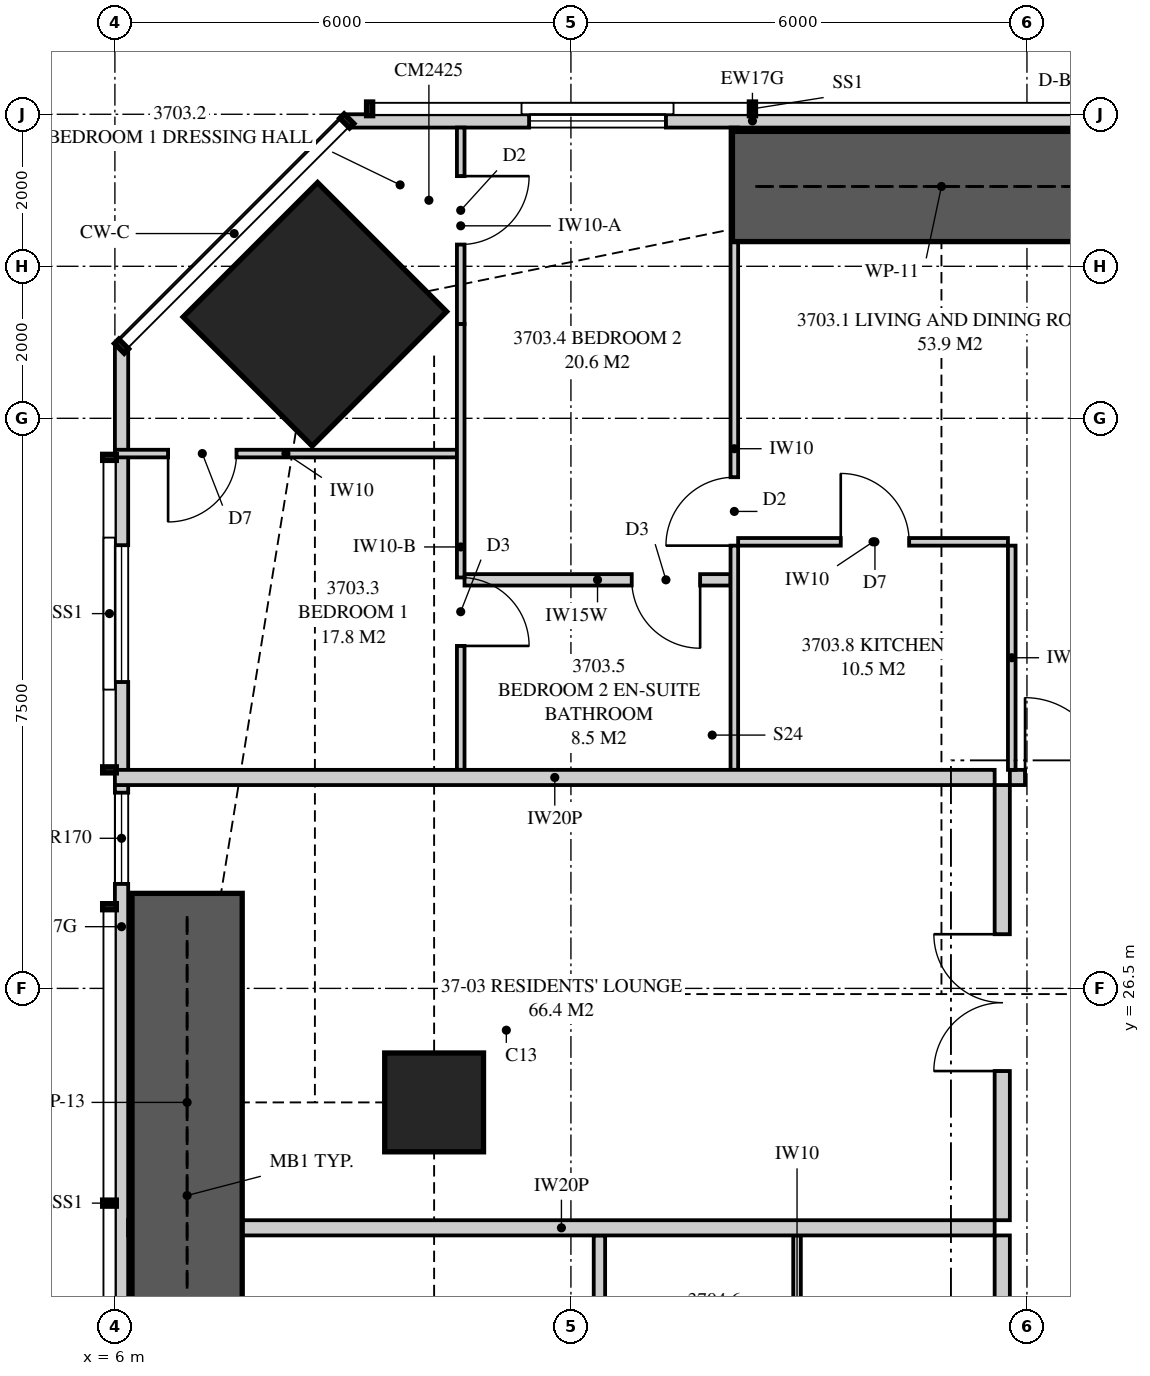
"""IFC4 building model, lengths in metres.
Left out: names, types, materials, properties, quantities, classifications, styles, units other than length and angle.
Written with IfcOpenShell. Run it as: python <this file> out.ifc"""

import sys

from ifc_helpers import new_model, si_unit, direction, frame, frame_2d, origin, origin_2d, place, context, subcontext, project, spatial, polyline, rectangle, outline, extrude, element, fill, save


model = new_model("IFC4")
c1 = context("Model", 3, precision=1e-05, world=origin(), true_north=direction((0.0, 1.0)))
c2 = subcontext(c1, "Body", "Model", "MODEL_VIEW")
j1 = project(units=[si_unit("LENGTHUNIT", "METRE"), si_unit("PLANEANGLEUNIT", "RADIAN")], contexts=[c1])
p1 = place(None, origin())
s1 = spatial("IfcSite", under=j1, at=p1, CompositionType="ELEMENT")
p2 = place(p1, origin())
s2 = spatial("IfcBuilding", under=s1, at=p2, CompositionType="ELEMENT")
p3 = place(p2, frame((0.0, 0.0, 135.0)))
s3 = spatial("IfcBuildingStorey", under=s2, at=p3, CompositionType="ELEMENT", Elevation=135.0)
p4 = place(p3, frame((8.631, 35.369, 0.0), z_axis=(0.0, 0.0, 1.0), x_axis=(0.707106781187, -0.707106781187, 0.0)))
e1 = element("IfcColumn", 1, at=p4, inside=s3, PredefinedType="COLUMN", context=c2, shape_type="SweptSolid", body=[
    extrude(rectangle(XDim=2.4, YDim=2.5, at=origin_2d()), origin(), (0.0, 0.0, 1.0), 3.35),
])
p5 = place(p3, frame((10.2, 25.0, 0.0), z_axis=(0.0, 0.0, 1.0), x_axis=(1.0, 0.0, 0.0)))
e2 = element("IfcColumn", 2, at=p5, inside=s3, PredefinedType="COLUMN", context=c2, shape_type="SweptSolid", body=[
    extrude(rectangle(XDim=1.3, YDim=1.3, at=origin_2d()), origin(), (0.0, 0.0, 1.0), 3.35),
])
p6 = place(p3, frame((19.725, 37.913, 0.0), z_axis=(0.0, 0.0, 1.0), x_axis=(-1.0, 0.0, 0.0)))
e3 = element("IfcWall", 3, at=p6, inside=s3, PredefinedType="SOLIDWALL", context=c2, shape_type="SweptSolid", body=[
    extrude(outline(polyline([(0.0, 0.0), (10.674, 0.0), (10.674, 3.11), (3.053, 3.11), (3.053, 2.15), (3.008, 2.15), (3.008, 3.11), (2.85, 3.11), (2.85, 2.15), (0.0, 2.15), (0.0, 0.0)])), frame((0.0, 0.087, 0.0), z_axis=(0.0, -1.0, 0.0), x_axis=(1.0, 0.0, 0.0)), (0.0, 0.0, 1.0), 0.175),
])
p7 = place(p6, frame((6.475, 0.0, 0.4)))
e4 = element("IfcOpeningElement", 4, at=p7, cuts=e3, PredefinedType="OPENING", context=c2, shape_type="SweptSolid", body=[
    extrude(rectangle(XDim=1.8, YDim=1.7, at=frame_2d((0.9, 0.85))), frame((0.0, 0.097, 0.0), z_axis=(0.0, -1.0, 0.0), x_axis=(1.0, 0.0, 0.0)), (0.0, 0.0, 1.0), 0.195),
])
p8 = place(p3, frame((6.087, 34.949, 0.0), z_axis=(0.0, 0.0, 1.0), x_axis=(0.0, -1.0, 0.0)))
e5 = element("IfcWall", 5, at=p8, inside=s3, PredefinedType="SOLIDWALL", context=c2, shape_type="SweptSolid", body=[
    extrude(outline(polyline([(0.0, 0.0), (15.274, 0.0), (15.274, 2.15), (9.949, 2.15), (9.949, 3.11), (9.823, 3.11), (9.823, 2.15), (9.73, 2.15), (9.73, 3.11), (0.0, 3.11), (0.0, 0.0)])), frame((0.0, 0.087, 0.0), z_axis=(0.0, -1.0, 0.0), x_axis=(1.0, 0.0, 0.0)), (0.0, 0.0, 1.0), 0.175),
])
p9 = place(p8, frame((2.618, 0.0, 0.4)))
e6 = element("IfcOpeningElement", 6, at=p9, cuts=e5, PredefinedType="OPENING", context=c2, shape_type="SweptSolid", body=[
    extrude(rectangle(XDim=1.8, YDim=1.7, at=frame_2d((0.9, 0.85))), frame((0.0, 0.097, 0.0), z_axis=(0.0, -1.0, 0.0), x_axis=(1.0, 0.0, 0.0)), (0.0, 0.0, 1.0), 0.195),
])
p10 = place(p8, frame((5.874, 0.0, 0.4)))
e7 = element("IfcOpeningElement", 7, at=p10, cuts=e5, PredefinedType="OPENING", context=c2, shape_type="SweptSolid", body=[
    extrude(rectangle(XDim=1.2, YDim=1.7, at=frame_2d((0.6, 0.85))), frame((0.0, 0.097, 0.0), z_axis=(0.0, -1.0, 0.0), x_axis=(1.0, 0.0, 0.0)), (0.0, 0.0, 1.0), 0.195),
])
p11 = place(p8, frame((12.819, 0.0, 0.4)))
e8 = element("IfcOpeningElement", 8, at=p11, cuts=e5, PredefinedType="OPENING", context=c2, shape_type="SweptSolid", body=[
    extrude(rectangle(XDim=1.8, YDim=1.7, at=frame_2d((0.9, 0.85))), frame((0.0, 0.097, 0.0), z_axis=(0.0, -1.0, 0.0), x_axis=(1.0, 0.0, 0.0)), (0.0, 0.0, 1.0), 0.195),
])
p12 = place(p3, frame((17.775, 29.275, 0.0), z_axis=(0.0, 0.0, 1.0), x_axis=(1.0, 0.0, 0.0)))
e9 = element("IfcWall", 9, at=p12, inside=s3, PredefinedType="PARTITIONING", context=c2, shape_type="SweptSolid", body=[
    extrude(rectangle(XDim=8.225, YDim=0.2, at=frame_2d((4.113, 0.0))), origin(), (0.0, 0.0, 1.0), 3.11),
])
p13 = place(p12, frame((0.2, 0.0, 0.0)))
e10 = element("IfcOpeningElement", 10, at=p13, cuts=e9, PredefinedType="OPENING", context=c2, shape_type="SweptSolid", body=[
    extrude(rectangle(XDim=1.05, YDim=2.2, at=frame_2d((0.525, 1.1))), frame((0.0, 0.11, 0.0), z_axis=(0.0, -1.0, 0.0), x_axis=(1.0, 0.0, 0.0)), (0.0, 0.0, 1.0), 0.22),
])
p14 = place(p3, frame((10.55, 37.825, 0.0), z_axis=(0.0, 0.0, 1.0), x_axis=(0.0, -1.0, 0.0)))
e11 = element("IfcWall", 11, at=p14, inside=s3, PredefinedType="PARTITIONING", context=c2, shape_type="SweptSolid", body=[
    extrude(outline(polyline([(0.0, 0.0), (2.585, 0.0), (2.585, 2.15), (1.188, 2.15), (1.188, 3.11), (0.0, 3.11), (0.0, 0.0)])), frame((0.0, 0.05, 0.0), z_axis=(0.0, -1.0, 0.0), x_axis=(1.0, 0.0, 0.0)), (0.0, 0.0, 1.0), 0.1),
])
p15 = place(p14, frame((0.639, 0.0, 0.0)))
e12 = element("IfcOpeningElement", 12, at=p15, cuts=e11, PredefinedType="OPENING", context=c2, shape_type="SweptSolid", body=[
    extrude(rectangle(XDim=0.9, YDim=2.1, at=frame_2d((0.45, 1.05))), frame((0.0, 0.06, 0.0), z_axis=(0.0, -1.0, 0.0), x_axis=(1.0, 0.0, 0.0)), (0.0, 0.0, 1.0), 0.12),
])
p16 = place(p3, frame((10.55, 35.24, 0.0), z_axis=(0.0, 0.0, 1.0), x_axis=(0.0, -1.0, 0.0)))
e13 = element("IfcWall", 13, at=p16, inside=s3, PredefinedType="PARTITIONING", context=c2, shape_type="SweptSolid", body=[
    extrude(outline(polyline([(0.0, 0.0), (5.865, 0.0), (5.865, 2.51), (0.358, 2.51), (0.358, 2.15), (0.0, 2.15), (0.0, 0.0)])), frame((0.0, 0.05, 0.0), z_axis=(0.0, -1.0, 0.0), x_axis=(1.0, 0.0, 0.0)), (0.0, 0.0, 1.0), 0.1),
])
p17 = place(p16, frame((3.334, 0.0, 0.0)))
e14 = element("IfcOpeningElement", 14, at=p17, cuts=e13, PredefinedType="OPENING", context=c2, shape_type="SweptSolid", body=[
    extrude(rectangle(XDim=0.9, YDim=2.1, at=frame_2d((0.45, 1.05))), frame((0.0, 0.06, 0.0), z_axis=(0.0, -1.0, 0.0), x_axis=(1.0, 0.0, 0.0)), (0.0, 0.0, 1.0), 0.12),
])
p18 = place(p3, frame((14.15, 37.825, 0.0), z_axis=(0.0, 0.0, 1.0), x_axis=(0.0, -1.0, 0.0)))
e15 = element("IfcWall", 15, at=p18, inside=s3, PredefinedType="PARTITIONING", context=c2, shape_type="SweptSolid", body=[
    extrude(outline(polyline([(0.0, 0.0), (8.45, 0.0), (8.45, 3.11), (2.208, 3.11), (2.208, 2.15), (0.453, 2.15), (0.453, 3.11), (0.0, 3.11), (0.0, 0.0)])), frame((0.0, 0.05, 0.0), z_axis=(0.0, -1.0, 0.0), x_axis=(1.0, 0.0, 0.0)), (0.0, 0.0, 1.0), 0.1),
])
p19 = place(p18, frame((4.6, 0.0, 0.0)))
e16 = element("IfcOpeningElement", 16, at=p19, cuts=e15, PredefinedType="OPENING", context=c2, shape_type="SweptSolid", body=[
    extrude(rectangle(XDim=0.9, YDim=2.1, at=frame_2d((0.45, 1.05))), frame((0.0, 0.06, 0.0), z_axis=(0.0, -1.0, 0.0), x_axis=(1.0, 0.0, 0.0)), (0.0, 0.0, 1.0), 0.12),
])
p20 = place(p3, frame((6.0, 33.536, 0.0), z_axis=(0.0, 0.0, 1.0), x_axis=(1.0, 0.0, 0.0)))
e17 = element("IfcWall", 17, at=p20, inside=s3, PredefinedType="PARTITIONING", context=c2, shape_type="SweptSolid", body=[
    extrude(outline(polyline([(0.0, 0.0), (4.5, 0.0), (4.5, 3.11), (4.5, 2.51), (3.206, 2.51), (3.206, 2.15), (1.463, 2.15), (1.463, 3.11), (0.0, 3.11), (0.0, 0.0)])), frame((0.0, 0.05, 0.0), z_axis=(0.0, -1.0, 0.0), x_axis=(1.0, 0.0, 0.0)), (0.0, 0.0, 1.0), 0.1),
])
p21 = place(p20, frame((0.7, 0.0, 0.0)))
e18 = element("IfcOpeningElement", 18, at=p21, cuts=e17, PredefinedType="OPENING", context=c2, shape_type="SweptSolid", body=[
    extrude(rectangle(XDim=0.9, YDim=2.1, at=frame_2d((0.45, 1.05))), frame((0.0, 0.06, 0.0), z_axis=(0.0, -1.0, 0.0), x_axis=(1.0, 0.0, 0.0)), (0.0, 0.0, 1.0), 0.12),
])
p22 = place(p3, frame((10.6, 31.875, 0.0), z_axis=(0.0, 0.0, 1.0), x_axis=(1.0, 0.0, 0.0)))
e19 = element("IfcWall", 19, at=p22, inside=s3, PredefinedType="PLUMBINGWALL", context=c2, shape_type="SweptSolid", body=[
    extrude(outline(polyline([(0.0, 0.0), (3.5, 0.0), (3.5, 3.11), (0.885, 3.11), (0.885, 2.51), (0.0, 2.51), (0.0, 3.11), (0.0, 0.0)])), frame((0.0, 0.075, 0.0), z_axis=(0.0, -1.0, 0.0), x_axis=(1.0, 0.0, 0.0)), (0.0, 0.0, 1.0), 0.15),
])
p23 = place(p22, frame((2.2, 0.0, 0.0)))
e20 = element("IfcOpeningElement", 20, at=p23, cuts=e19, PredefinedType="OPENING", context=c2, shape_type="SweptSolid", body=[
    extrude(rectangle(XDim=0.9, YDim=2.1, at=frame_2d((0.45, 1.05))), frame((0.0, 0.085, 0.0), z_axis=(0.0, -1.0, 0.0), x_axis=(1.0, 0.0, 0.0)), (0.0, 0.0, 1.0), 0.17),
])
p24 = place(p3, frame((14.2, 32.375, 0.0), z_axis=(0.0, 0.0, 1.0), x_axis=(1.0, 0.0, 0.0)))
e21 = element("IfcWall", 21, at=p24, inside=s3, PredefinedType="PARTITIONING", context=c2, shape_type="SweptSolid", body=[
    extrude(outline(polyline([(0.0, 0.0), (3.55, 0.0), (3.55, 3.11), (2.962, 3.11), (2.962, 2.541), (2.388, 2.541), (2.388, 3.11), (0.0, 3.11), (0.0, 0.0)])), frame((0.0, 0.05, 0.0), z_axis=(0.0, -1.0, 0.0), x_axis=(1.0, 0.0, 0.0)), (0.0, 0.0, 1.0), 0.1),
])
p25 = place(p24, frame((1.35, 0.0, 0.0)))
e22 = element("IfcOpeningElement", 22, at=p25, cuts=e21, PredefinedType="OPENING", context=c2, shape_type="SweptSolid", body=[
    extrude(rectangle(XDim=0.9, YDim=2.1, at=frame_2d((0.45, 1.05))), frame((0.0, 0.06, 0.0), z_axis=(0.0, -1.0, 0.0), x_axis=(1.0, 0.0, 0.0)), (0.0, 0.0, 1.0), 0.12),
])
p26 = place(p3, frame((17.8, 32.325, 0.0), z_axis=(0.0, 0.0, 1.0), x_axis=(0.0, -1.0, 0.0)))
e23 = element("IfcWall", 23, at=p26, inside=s3, PredefinedType="PARTITIONING", context=c2, shape_type="SweptSolid", body=[
    extrude(rectangle(XDim=2.95, YDim=0.1, at=frame_2d((1.475, 0.0))), origin(), (0.0, 0.0, 1.0), 3.11),
])
p27 = place(p3, frame((6.0, 29.275, 0.0), z_axis=(0.0, 0.0, 1.0), x_axis=(1.0, 0.0, 0.0)))
e24 = element("IfcWall", 24, at=p27, inside=s3, PredefinedType="PARTITIONING", context=c2, shape_type="SweptSolid", body=[
    extrude(outline(polyline([(0.0, 0.0), (11.575, 0.0), (11.575, 3.11), (11.212, 3.11), (11.212, 2.541), (10.538, 2.541), (10.538, 3.11), (5.51, 3.11), (5.51, 2.51), (2.969, 2.51), (2.969, 2.541), (2.565, 2.541), (2.565, 2.15), (0.721, 2.15), (0.721, 3.11), (0.0, 3.11), (0.0, 0.0)])), frame((0.0, 0.1, 0.0), z_axis=(0.0, -1.0, 0.0), x_axis=(1.0, 0.0, 0.0)), (0.0, 0.0, 1.0), 0.2),
])
p28 = place(p3, frame((6.175, 23.35, 0.0), z_axis=(0.0, 0.0, 1.0), x_axis=(1.0, 0.0, 0.0)))
e25 = element("IfcWall", 25, at=p28, inside=s3, PredefinedType="PARTITIONING", context=c2, shape_type="SweptSolid", body=[
    extrude(outline(polyline([(0.529, 2.15), (0.0, 2.15), (0.0, 0.0), (0.529, 0.0), (0.529, 0.376), (1.021, 0.376), (1.021, 0.0), (11.4, 0.0), (11.4, 3.11), (5.335, 3.11), (5.335, 2.51), (2.715, 2.51), (2.715, 3.11), (1.685, 3.11), (1.685, 2.15), (1.021, 2.15), (1.021, 1.774), (0.529, 1.774), (0.529, 2.15)])), frame((0.0, 0.1, 0.0), z_axis=(0.0, -1.0, 0.0), x_axis=(1.0, 0.0, 0.0)), (0.0, 0.0, 1.0), 0.2),
])
p29 = place(p3, frame((17.675, 7.825, 0.0), z_axis=(0.0, 0.0, 1.0), x_axis=(0.0, 1.0, 0.0)))
e26 = element("IfcWall", 26, at=p29, inside=s3, PredefinedType="PARTITIONING", context=c2, shape_type="SweptSolid", body=[
    extrude(outline(polyline([(0.0, 0.0), (15.425, 0.0), (15.425, 3.11), (3.087, 3.11), (3.087, 2.541), (2.413, 2.541), (2.413, 3.11), (0.0, 3.11), (0.0, 0.0)])), frame((0.0, 0.1, 0.0), z_axis=(0.0, -1.0, 0.0), x_axis=(1.0, 0.0, 0.0)), (0.0, 0.0, 1.0), 0.2),
])
p30 = place(p29, frame((7.212, 0.0, 0.0)))
e27 = element("IfcOpeningElement", 27, at=p30, cuts=e26, PredefinedType="OPENING", context=c2, shape_type="SweptSolid", body=[
    extrude(rectangle(XDim=1.05, YDim=2.2, at=frame_2d((0.525, 1.1))), frame((0.0, 0.11, 0.0), z_axis=(0.0, -1.0, 0.0), x_axis=(1.0, 0.0, 0.0)), (0.0, 0.0, 1.0), 0.22),
])
p31 = place(p3, frame((12.375, 19.775, 0.0), z_axis=(0.0, 0.0, 1.0), x_axis=(0.0, 1.0, 0.0)))
e28 = element("IfcWall", 28, at=p31, inside=s3, PredefinedType="PLUMBINGWALL", context=c2, shape_type="SweptSolid", body=[
    extrude(rectangle(XDim=3.475, YDim=0.15, at=frame_2d((1.738, 0.0))), origin(), (0.0, 0.0, 1.0), 3.11),
])
p32 = place(p31, frame((0.4, 0.0, 0.0)))
e29 = element("IfcOpeningElement", 29, at=p32, cuts=e28, PredefinedType="OPENING", context=c2, shape_type="SweptSolid", body=[
    extrude(rectangle(XDim=0.9, YDim=2.1, at=frame_2d((0.45, 1.05))), frame((0.0, 0.085, 0.0), z_axis=(0.0, -1.0, 0.0), x_axis=(1.0, 0.0, 0.0)), (0.0, 0.0, 1.0), 0.17),
])
p33 = place(p3, frame((14.975, 19.775, 0.0), z_axis=(0.0, 0.0, 1.0), x_axis=(0.0, 1.0, 0.0)))
e30 = element("IfcWall", 30, at=p33, inside=s3, PredefinedType="PARTITIONING", context=c2, shape_type="SweptSolid", body=[
    extrude(rectangle(XDim=3.475, YDim=0.1, at=frame_2d((1.738, 0.0))), origin(), (0.0, 0.0, 1.0), 3.11),
])
p34 = place(p3, frame((17.675, 23.45, 0.0), z_axis=(0.0, 0.0, 1.0), x_axis=(0.0, 1.0, 0.0)))
e31 = element("IfcWall", 31, at=p34, inside=s3, PredefinedType="PARTITIONING", context=c2, shape_type="SweptSolid", body=[
    extrude(outline(polyline([(0.0, 0.0), (5.725, 0.0), (5.725, 3.11), (3.312, 3.11), (3.312, 2.541), (2.638, 2.541), (2.638, 3.11), (0.0, 3.11), (0.0, 0.0)])), frame((0.0, 0.1, 0.0), z_axis=(0.0, -1.0, 0.0), x_axis=(1.0, 0.0, 0.0)), (0.0, 0.0, 1.0), 0.2),
])
p35 = place(p34, frame((1.962, 0.0, 0.0)))
e32 = element("IfcOpeningElement", 32, at=p35, cuts=e31, PredefinedType="OPENING", context=c2, shape_type="SweptSolid", body=[
    extrude(rectangle(XDim=1.8, YDim=2.1, at=frame_2d((0.9, 1.05))), frame((0.0, 0.11, 0.0), z_axis=(0.0, -1.0, 0.0), x_axis=(1.0, 0.0, 0.0)), (0.0, 0.0, 1.0), 0.22),
])
for number, where, z_axis, x_axis in (
    (33, (14.125, 37.05, 0.0), (0.0, 0.0, 1.0), (1.0, 0.0, 0.0)),
    (34, (6.95, 22.25, 0.0), (0.0, 0.0, 1.0), (0.0, 1.0, 0.0)),
):
    element("IfcWall", number, at=place(p3, frame(where, z_axis=z_axis, x_axis=x_axis)), inside=s3, PredefinedType="SHEAR", context=c2, shape_type="SweptSolid", body=[
        extrude(rectangle(XDim=5.5, YDim=1.45, at=frame_2d((2.75, 0.0))), origin(), (0.0, 0.0, 1.0), 3.35),
    ])
p36 = place(p7, origin())
e35 = element("IfcWindow", 35, at=p36, inside=s3, PartitioningType="SINGLE_PANEL", PredefinedType="WINDOW", context=c2, shape_type="SweptSolid", body=[
    extrude(rectangle(XDim=1.8, YDim=1.7, at=frame_2d((0.9, 0.85))), frame((0.0, 0.03, 0.0), z_axis=(0.0, -1.0, 0.0), x_axis=(1.0, 0.0, 0.0)), (0.0, 0.0, 1.0), 0.06),
])
fill(e4, e35)
p37 = place(p9, origin())
e36 = element("IfcWindow", 36, at=p37, inside=s3, PartitioningType="SINGLE_PANEL", PredefinedType="WINDOW", context=c2, shape_type="SweptSolid", body=[
    extrude(rectangle(XDim=1.8, YDim=1.7, at=frame_2d((0.9, 0.85))), frame((0.0, 0.03, 0.0), z_axis=(0.0, -1.0, 0.0), x_axis=(1.0, 0.0, 0.0)), (0.0, 0.0, 1.0), 0.06),
])
fill(e6, e36)
p38 = place(p10, origin())
e37 = element("IfcWindow", 37, at=p38, inside=s3, PartitioningType="SINGLE_PANEL", PredefinedType="WINDOW", context=c2, shape_type="SweptSolid", body=[
    extrude(rectangle(XDim=1.2, YDim=1.7, at=frame_2d((0.6, 0.85))), frame((0.0, 0.03, 0.0), z_axis=(0.0, -1.0, 0.0), x_axis=(1.0, 0.0, 0.0)), (0.0, 0.0, 1.0), 0.06),
])
fill(e7, e37)
p39 = place(p13, origin())
e38 = element("IfcDoor", 38, at=p39, inside=s3, OperationType="SINGLE_SWING_LEFT", PredefinedType="DOOR", context=c2, shape_type="SweptSolid", body=[
    extrude(rectangle(XDim=1.05, YDim=2.2, at=frame_2d((0.525, 1.1))), frame((0.0, 0.025, 0.0), z_axis=(0.0, -1.0, 0.0), x_axis=(1.0, 0.0, 0.0)), (0.0, 0.0, 1.0), 0.05),
])
fill(e10, e38)
p40 = place(p21, frame((0.9, 0.0, 0.0), z_axis=(0.0, 0.0, 1.0), x_axis=(-1.0, 0.0, 0.0)))
e39 = element("IfcDoor", 39, at=p40, inside=s3, OperationType="SINGLE_SWING_RIGHT", PredefinedType="DOOR", context=c2, shape_type="SweptSolid", body=[
    extrude(rectangle(XDim=0.9, YDim=2.1, at=frame_2d((0.45, 1.05))), frame((0.0, 0.025, 0.0), z_axis=(0.0, -1.0, 0.0), x_axis=(1.0, 0.0, 0.0)), (0.0, 0.0, 1.0), 0.05),
])
fill(e18, e39)
p41 = place(p15, origin())
e40 = element("IfcDoor", 40, at=p41, inside=s3, OperationType="SINGLE_SWING_LEFT", PredefinedType="DOOR", context=c2, shape_type="SweptSolid", body=[
    extrude(rectangle(XDim=0.9, YDim=2.1, at=frame_2d((0.45, 1.05))), frame((0.0, 0.025, 0.0), z_axis=(0.0, -1.0, 0.0), x_axis=(1.0, 0.0, 0.0)), (0.0, 0.0, 1.0), 0.05),
])
fill(e12, e40)
p42 = place(p19, frame((0.9, 0.0, 0.0), z_axis=(0.0, 0.0, 1.0), x_axis=(-1.0, 0.0, 0.0)))
e41 = element("IfcDoor", 41, at=p42, inside=s3, OperationType="SINGLE_SWING_LEFT", PredefinedType="DOOR", context=c2, shape_type="SweptSolid", body=[
    extrude(rectangle(XDim=0.9, YDim=2.1, at=frame_2d((0.45, 1.05))), frame((0.0, 0.025, 0.0), z_axis=(0.0, -1.0, 0.0), x_axis=(1.0, 0.0, 0.0)), (0.0, 0.0, 1.0), 0.05),
])
fill(e16, e41)
p43 = place(p23, frame((0.9, 0.0, 0.0), z_axis=(0.0, 0.0, 1.0), x_axis=(-1.0, 0.0, 0.0)))
e42 = element("IfcDoor", 42, at=p43, inside=s3, OperationType="SINGLE_SWING_LEFT", PredefinedType="DOOR", context=c2, shape_type="SweptSolid", body=[
    extrude(rectangle(XDim=0.9, YDim=2.1, at=frame_2d((0.45, 1.05))), frame((0.0, 0.025, 0.0), z_axis=(0.0, -1.0, 0.0), x_axis=(1.0, 0.0, 0.0)), (0.0, 0.0, 1.0), 0.05),
])
fill(e20, e42)
p44 = place(p17, origin())
e43 = element("IfcDoor", 43, at=p44, inside=s3, OperationType="SINGLE_SWING_RIGHT", PredefinedType="DOOR", context=c2, shape_type="SweptSolid", body=[
    extrude(rectangle(XDim=0.9, YDim=2.1, at=frame_2d((0.45, 1.05))), frame((0.0, 0.025, 0.0), z_axis=(0.0, -1.0, 0.0), x_axis=(1.0, 0.0, 0.0)), (0.0, 0.0, 1.0), 0.05),
])
fill(e14, e43)
p45 = place(p25, origin())
e44 = element("IfcDoor", 44, at=p45, inside=s3, OperationType="SINGLE_SWING_LEFT", PredefinedType="DOOR", context=c2, shape_type="SweptSolid", body=[
    extrude(rectangle(XDim=0.9, YDim=2.1, at=frame_2d((0.45, 1.05))), frame((0.0, 0.025, 0.0), z_axis=(0.0, -1.0, 0.0), x_axis=(1.0, 0.0, 0.0)), (0.0, 0.0, 1.0), 0.05),
])
fill(e22, e44)
p46 = place(p35, origin())
e45 = element("IfcDoor", 45, at=p46, inside=s3, OperationType="DOUBLE_DOOR_SINGLE_SWING", PredefinedType="DOOR", context=c2, shape_type="SweptSolid", body=[
    extrude(rectangle(XDim=1.8, YDim=2.1, at=frame_2d((0.9, 1.05))), frame((0.0, 0.025, 0.0), z_axis=(0.0, -1.0, 0.0), x_axis=(1.0, 0.0, 0.0)), (0.0, 0.0, 1.0), 0.05),
])
fill(e32, e45)
save(model, sys.argv[1])
